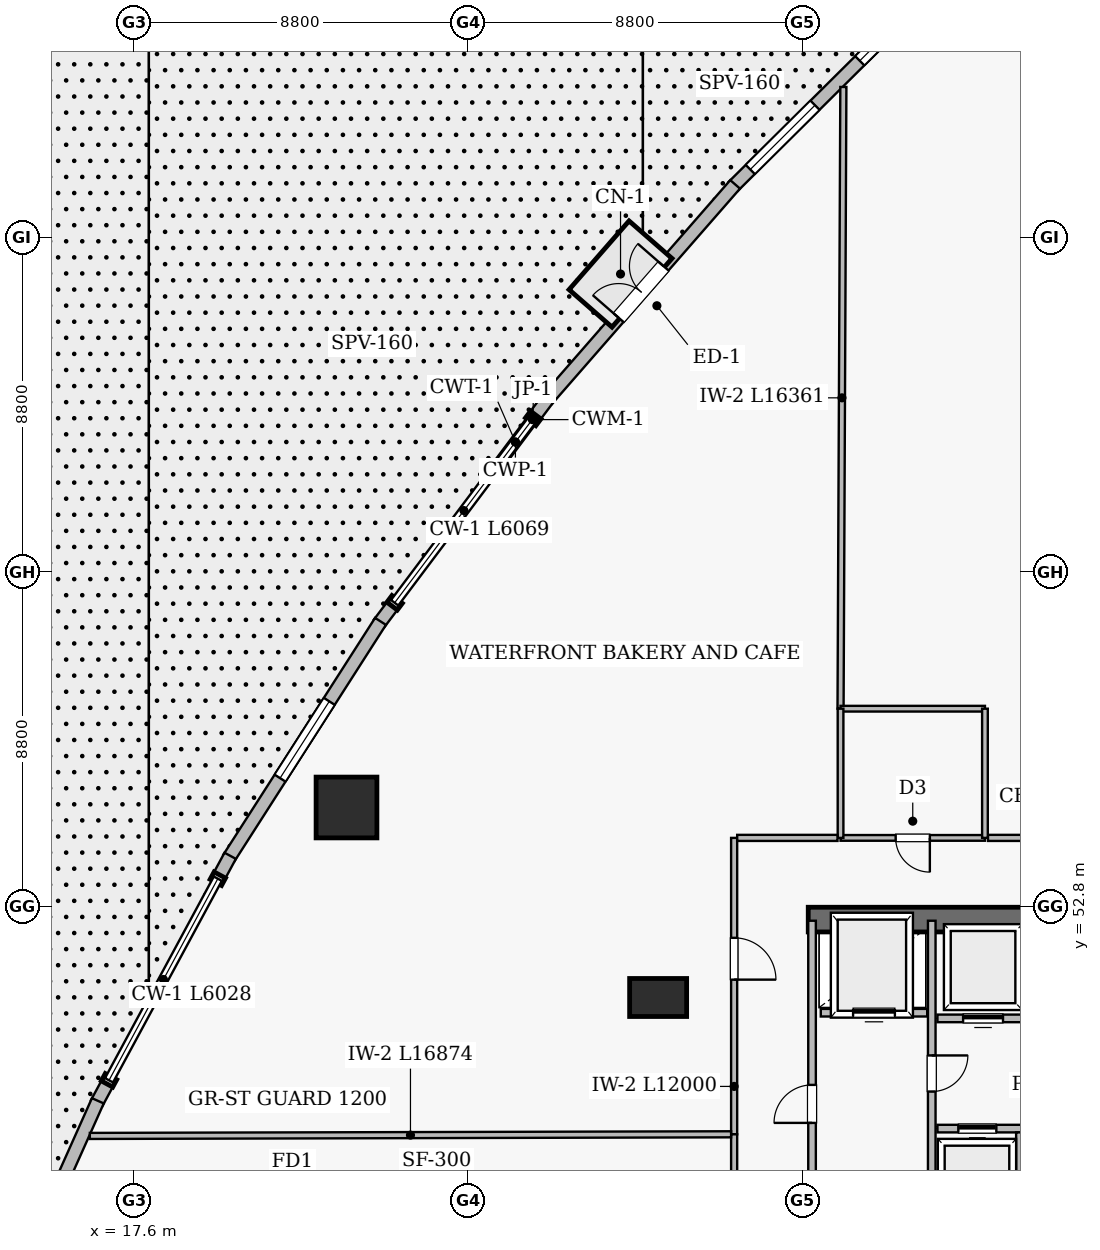
"""IFC4 building model, lengths in metres.
Left out: names, types, materials, properties, quantities, classifications, styles, units other than length and angle.
Written with IfcOpenShell. Run it as: python <this file> out.ifc"""

import sys

from ifc_helpers import new_model, si_unit, direction, frame, frame_2d, origin, origin_2d, place, context, subcontext, project, spatial, rectangle, extrude, element, fill, save


model = new_model("IFC4")
c1 = context("Model", 3, precision=1e-05, world=origin(), true_north=direction((0.0, 1.0)))
c2 = subcontext(c1, "Body", "Model", "MODEL_VIEW")
j1 = project(units=[si_unit("LENGTHUNIT", "METRE"), si_unit("PLANEANGLEUNIT", "RADIAN")], contexts=[c1])
p1 = place(None, origin())
s1 = spatial("IfcSite", under=j1, at=p1, CompositionType="ELEMENT")
p2 = place(p1, origin())
s2 = spatial("IfcBuilding", under=s1, at=p2, CompositionType="ELEMENT")
p3 = place(p2, origin())
s3 = spatial("IfcBuildingStorey", under=s2, at=p3, CompositionType="ELEMENT", Elevation=0.0)
p4 = place(p3, frame((35.35, 52.45, 0.0), z_axis=(0.0, 0.0, 1.0), x_axis=(1.0, 0.0, 0.0)))
e1 = element("IfcWall", 1, at=p4, inside=s3, PredefinedType="SHEAR", context=c2, shape_type="SweptSolid", body=[
    extrude(rectangle(XDim=17.3, YDim=0.65, at=frame_2d((8.65, 0.0))), origin(), (0.0, 0.0, 1.0), 4.5),
])
p5 = place(p3, frame((31.4, 50.4, 0.0), z_axis=(0.0, 0.0, 1.0), x_axis=(1.0, 0.0, 0.0)))
e2 = element("IfcColumn", 2, at=p5, inside=s3, PredefinedType="COLUMN", context=c2, shape_type="SweptSolid", body=[
    extrude(rectangle(XDim=1.5, YDim=1.0, at=origin_2d()), origin(), (0.0, 0.0, 1.0), 4.8),
])
p6 = place(p3, frame((23.2, 55.4, 0.0), z_axis=(0.0, 0.0, 1.0), x_axis=(1.0, 0.0, 0.0)))
e3 = element("IfcColumn", 3, at=p6, inside=s3, PredefinedType="COLUMN", context=c2, shape_type="SweptSolid", body=[
    extrude(rectangle(XDim=1.6, YDim=1.6, at=origin_2d()), origin(), (0.0, 0.0, 1.0), 4.8),
])
p7 = place(p3, frame((38.801, 77.13, 0.0), z_axis=(0.0, 0.0, 1.0), x_axis=(-0.709690172366, -0.704513917, 0.0)))
e4 = element("IfcWall", 4, at=p7, inside=s3, PredefinedType="SOLIDWALL", context=c2, shape_type="SweptSolid", body=[
    extrude(rectangle(XDim=7.641, YDim=0.34, at=frame_2d((3.82, 0.0))), origin(), (0.0, 0.0, 1.0), 4.5),
])
p8 = place(p7, frame((0.552, 0.0, 0.75)))
e5 = element("IfcOpeningElement", 5, at=p8, cuts=e4, PredefinedType="OPENING", context=c2, shape_type="SweptSolid", body=[
    extrude(rectangle(XDim=2.4, YDim=2.2, at=frame_2d((1.2, 1.1))), frame((0.0, 0.18, 0.0), z_axis=(0.0, -1.0, 0.0), x_axis=(1.0, 0.0, 0.0)), (0.0, 0.0, 1.0), 0.36),
])
p9 = place(p7, frame((4.612, 0.0, 0.75)))
e6 = element("IfcOpeningElement", 6, at=p9, cuts=e4, PredefinedType="OPENING", context=c2, shape_type="SweptSolid", body=[
    extrude(rectangle(XDim=2.4, YDim=2.2, at=frame_2d((1.2, 1.1))), frame((0.0, 0.18, 0.0), z_axis=(0.0, -1.0, 0.0), x_axis=(1.0, 0.0, 0.0)), (0.0, 0.0, 1.0), 0.36),
])
p10 = place(p3, frame((33.426, 71.798, 0.0), z_axis=(0.0, 0.0, 1.0), x_axis=(-0.657686013661, -0.753292179327, 0.0)))
e7 = element("IfcWall", 7, at=p10, inside=s3, PredefinedType="SOLIDWALL", context=c2, shape_type="SweptSolid", body=[
    extrude(rectangle(XDim=7.52, YDim=0.34, at=frame_2d((3.76, 0.0))), origin(), (0.0, 0.0, 1.0), 4.5),
])
p11 = place(p10, frame((2.86, 0.0, 0.0)))
e8 = element("IfcOpeningElement", 8, at=p11, cuts=e7, PredefinedType="OPENING", context=c2, shape_type="SweptSolid", body=[
    extrude(rectangle(XDim=1.8, YDim=2.25, at=frame_2d((0.9, 1.125))), frame((0.0, 0.18, 0.0), z_axis=(0.0, -1.0, 0.0), x_axis=(1.0, 0.0, 0.0)), (0.0, 0.0, 1.0), 0.36),
])
p12 = place(p3, frame((28.524, 66.187, 0.0), z_axis=(0.0, 0.0, 1.0), x_axis=(-0.600664888718, -0.799500901477, 0.0)))
e9 = element("IfcWall", 9, at=p12, inside=s3, PredefinedType="SOLIDWALL", context=c2, shape_type="SweptSolid", body=[
    extrude(rectangle(XDim=0.705, YDim=0.34, at=frame_2d((0.353, 0.0))), origin(), (0.0, 0.0, 1.0), 4.5),
])
p13 = place(p3, frame((24.479, 60.804, 0.0), z_axis=(0.0, 0.0, 1.0), x_axis=(-0.600719928326, -0.799459547265, 0.0)))
e10 = element("IfcWall", 10, at=p13, inside=s3, PredefinedType="SOLIDWALL", context=c2, shape_type="SweptSolid", body=[
    extrude(rectangle(XDim=0.705, YDim=0.34, at=frame_2d((0.353, 0.0))), origin(), (0.0, 0.0, 1.0), 4.5),
])
p14 = place(p3, frame((24.095, 60.298, 0.0), z_axis=(0.0, 0.0, 1.0), x_axis=(-0.539522772187, -0.841971007987, 0.0)))
e11 = element("IfcWall", 11, at=p14, inside=s3, PredefinedType="SOLIDWALL", context=c2, shape_type="SweptSolid", body=[
    extrude(rectangle(XDim=7.398, YDim=0.34, at=frame_2d((3.699, 0.0))), origin(), (0.0, 0.0, 1.0), 4.5),
])
p15 = place(p14, frame((2.499, 0.0, 0.75)))
e12 = element("IfcOpeningElement", 12, at=p15, cuts=e11, PredefinedType="OPENING", context=c2, shape_type="SweptSolid", body=[
    extrude(rectangle(XDim=2.4, YDim=2.2, at=frame_2d((1.2, 1.1))), frame((0.0, 0.18, 0.0), z_axis=(0.0, -1.0, 0.0), x_axis=(1.0, 0.0, 0.0)), (0.0, 0.0, 1.0), 0.36),
])
p16 = place(p3, frame((20.139, 54.129, 0.0), z_axis=(0.0, 0.0, 1.0), x_axis=(-0.475111378879, -0.879925665985, 0.0)))
e13 = element("IfcWall", 13, at=p16, inside=s3, PredefinedType="SOLIDWALL", context=c2, shape_type="SweptSolid", body=[
    extrude(rectangle(XDim=0.705, YDim=0.34, at=frame_2d((0.353, 0.0))), origin(), (0.0, 0.0, 1.0), 4.5),
])
p17 = place(p3, frame((16.96, 48.239, 0.0), z_axis=(0.0, 0.0, 1.0), x_axis=(-0.474987965168, -0.879992291413, 0.0)))
e14 = element("IfcWall", 14, at=p17, inside=s3, PredefinedType="SOLIDWALL", context=c2, shape_type="SweptSolid", body=[
    extrude(rectangle(XDim=0.705, YDim=0.34, at=frame_2d((0.352, 0.0))), origin(), (0.0, 0.0, 1.0), 4.5),
])
p18 = place(p3, frame((16.656, 47.682, 0.0), z_axis=(0.0, 0.0, 1.0), x_axis=(-0.408068113154, -0.912951485582, 0.0)))
e15 = element("IfcWall", 15, at=p18, inside=s3, PredefinedType="SOLIDWALL", context=c2, shape_type="SweptSolid", body=[
    extrude(rectangle(XDim=7.439, YDim=0.34, at=frame_2d((3.719, 0.0))), origin(), (0.0, 0.0, 1.0), 4.5),
])
p19 = place(p18, frame((2.33, 0.0, 0.0)))
e16 = element("IfcOpeningElement", 16, at=p19, cuts=e15, PredefinedType="OPENING", context=c2, shape_type="SweptSolid", body=[
    extrude(rectangle(XDim=1.8, YDim=2.25, at=frame_2d((0.9, 1.125))), frame((0.0, 0.18, 0.0), z_axis=(0.0, -1.0, 0.0), x_axis=(1.0, 0.0, 0.0)), (0.0, 0.0, 1.0), 0.36),
])
p20 = place(p3, frame((54.52, 54.6, 0.0), z_axis=(0.0, 0.0, 1.0), x_axis=(-1.0, 0.0, 0.0)))
e17 = element("IfcWall", 17, at=p20, inside=s3, PredefinedType="SOLIDWALL", context=c2, shape_type="SweptSolid", body=[
    extrude(rectangle(XDim=14.44, YDim=0.16, at=frame_2d((7.22, 0.0))), origin(), (0.0, 0.0, 1.0), 3.9),
])
p21 = place(p20, frame((6.67, 0.0, 0.0)))
e18 = element("IfcOpeningElement", 18, at=p21, cuts=e17, PredefinedType="OPENING", context=c2, shape_type="SweptSolid", body=[
    extrude(rectangle(XDim=1.1, YDim=2.15, at=frame_2d((0.55, 1.075))), frame((0.0, 0.09, 0.0), z_axis=(0.0, -1.0, 0.0), x_axis=(1.0, 0.0, 0.0)), (0.0, 0.0, 1.0), 0.18),
])
p22 = place(p3, frame((35.45, 44.5, 0.0), z_axis=(0.0, 0.0, 1.0), x_axis=(0.0, 1.0, 0.0)))
e19 = element("IfcWall", 19, at=p22, inside=s3, PredefinedType="SOLIDWALL", context=c2, shape_type="SweptSolid", body=[
    extrude(rectangle(XDim=7.92, YDim=0.2, at=frame_2d((3.96, 0.0))), origin(), (0.0, 0.0, 1.0), 4.5),
])
p23 = place(p22, frame((2.6, 0.0, 0.0)))
e20 = element("IfcOpeningElement", 20, at=p23, cuts=e19, PredefinedType="OPENING", context=c2, shape_type="SweptSolid", body=[
    extrude(rectangle(XDim=1.0, YDim=2.15, at=frame_2d((0.5, 1.075))), frame((0.0, 0.11, 0.0), z_axis=(0.0, -1.0, 0.0), x_axis=(1.0, 0.0, 0.0)), (0.0, 0.0, 1.0), 0.22),
])
p24 = place(p3, frame((38.6, 44.5, 0.0), z_axis=(0.0, 0.0, 1.0), x_axis=(0.0, 1.0, 0.0)))
e21 = element("IfcWall", 21, at=p24, inside=s3, PredefinedType="SOLIDWALL", context=c2, shape_type="SweptSolid", body=[
    extrude(rectangle(XDim=7.92, YDim=0.2, at=frame_2d((3.96, 0.0))), origin(), (0.0, 0.0, 1.0), 4.5),
])
p25 = place(p24, frame((3.425, 0.0, 0.0)))
e22 = element("IfcOpeningElement", 22, at=p25, cuts=e21, PredefinedType="OPENING", context=c2, shape_type="SweptSolid", body=[
    extrude(rectangle(XDim=0.95, YDim=2.15, at=frame_2d((0.475, 1.075))), frame((0.0, 0.11, 0.0), z_axis=(0.0, -1.0, 0.0), x_axis=(1.0, 0.0, 0.0)), (0.0, 0.0, 1.0), 0.22),
])
p26 = place(p3, frame((33.4, 54.6, 0.0), z_axis=(0.0, 0.0, 1.0), x_axis=(0.0, -1.0, 0.0)))
e23 = element("IfcWall", 23, at=p26, inside=s3, PredefinedType="SOLIDWALL", context=c2, shape_type="SweptSolid", body=[
    extrude(rectangle(XDim=7.8, YDim=0.16, at=frame_2d((3.9, 0.0))), origin(), (0.0, 0.0, 1.0), 3.9),
])
p27 = place(p26, frame((2.63, 0.0, 0.0)))
e24 = element("IfcOpeningElement", 24, at=p27, cuts=e23, PredefinedType="OPENING", context=c2, shape_type="SweptSolid", body=[
    extrude(rectangle(XDim=1.1, YDim=2.15, at=frame_2d((0.55, 1.075))), frame((0.0, 0.09, 0.0), z_axis=(0.0, -1.0, 0.0), x_axis=(1.0, 0.0, 0.0)), (0.0, 0.0, 1.0), 0.18),
])
p28 = place(p3, frame((38.75, 49.85, 0.0), z_axis=(0.0, 0.0, 1.0), x_axis=(1.0, 0.0, 0.0)))
e25 = element("IfcWall", 25, at=p28, inside=s3, PredefinedType="SOLIDWALL", context=c2, shape_type="SweptSolid", body=[
    extrude(rectangle(XDim=5.5, YDim=0.2, at=frame_2d((2.75, 0.0))), origin(), (0.0, 0.0, 1.0), 4.5),
])
p29 = place(p28, frame((0.675, 0.0, 0.0)))
e26 = element("IfcOpeningElement", 26, at=p29, cuts=e25, PredefinedType="OPENING", context=c2, shape_type="SweptSolid", body=[
    extrude(rectangle(XDim=1.05, YDim=2.15, at=frame_2d((0.525, 1.075))), frame((0.0, 0.11, 0.0), z_axis=(0.0, -1.0, 0.0), x_axis=(1.0, 0.0, 0.0)), (0.0, 0.0, 1.0), 0.22),
])
p30 = place(p28, frame((3.075, 0.0, 0.0)))
e27 = element("IfcOpeningElement", 27, at=p30, cuts=e25, PredefinedType="OPENING", context=c2, shape_type="SweptSolid", body=[
    extrude(rectangle(XDim=1.05, YDim=2.15, at=frame_2d((0.525, 1.075))), frame((0.0, 0.11, 0.0), z_axis=(0.0, -1.0, 0.0), x_axis=(1.0, 0.0, 0.0)), (0.0, 0.0, 1.0), 0.22),
])
p31 = place(p3, frame((38.75, 46.95, 0.0), z_axis=(0.0, 0.0, 1.0), x_axis=(1.0, 0.0, 0.0)))
e28 = element("IfcWall", 28, at=p31, inside=s3, PredefinedType="SOLIDWALL", context=c2, shape_type="SweptSolid", body=[
    extrude(rectangle(XDim=4.33, YDim=0.2, at=frame_2d((2.165, 0.0))), origin(), (0.0, 0.0, 1.0), 4.5),
])
p32 = place(p31, frame((0.55, 0.0, 0.0)))
e29 = element("IfcOpeningElement", 29, at=p32, cuts=e28, PredefinedType="OPENING", context=c2, shape_type="SweptSolid", body=[
    extrude(rectangle(XDim=1.0, YDim=2.15, at=frame_2d((0.5, 1.075))), frame((0.0, 0.11, 0.0), z_axis=(0.0, -1.0, 0.0), x_axis=(1.0, 0.0, 0.0)), (0.0, 0.0, 1.0), 0.22),
])
p33 = place(p31, frame((2.75, 0.0, 0.0)))
e30 = element("IfcOpeningElement", 30, at=p33, cuts=e28, PredefinedType="OPENING", context=c2, shape_type="SweptSolid", body=[
    extrude(rectangle(XDim=1.0, YDim=2.15, at=frame_2d((0.5, 1.075))), frame((0.0, 0.11, 0.0), z_axis=(0.0, -1.0, 0.0), x_axis=(1.0, 0.0, 0.0)), (0.0, 0.0, 1.0), 0.22),
])
p34 = place(p3, frame((33.4, 46.8, 0.0), z_axis=(0.0, 0.0, 1.0), x_axis=(0.0, -1.0, 0.0)))
e31 = element("IfcWall", 31, at=p34, inside=s3, PredefinedType="SOLIDWALL", context=c2, shape_type="SweptSolid", body=[
    extrude(rectangle(XDim=4.2, YDim=0.16, at=frame_2d((2.1, 0.0))), origin(), (0.0, 0.0, 1.0), 3.738),
])
p35 = place(p34, frame((1.55, 0.0, 0.0)))
e32 = element("IfcOpeningElement", 32, at=p35, cuts=e31, PredefinedType="OPENING", context=c2, shape_type="SweptSolid", body=[
    extrude(rectangle(XDim=1.1, YDim=2.15, at=frame_2d((0.55, 1.075))), frame((0.0, 0.09, 0.0), z_axis=(0.0, -1.0, 0.0), x_axis=(1.0, 0.0, 0.0)), (0.0, 0.0, 1.0), 0.18),
])
p36 = place(p3, frame((40.0, 54.6, 0.0), z_axis=(0.0, 0.0, 1.0), x_axis=(-1.0, 0.0, 0.0)))
e33 = element("IfcWall", 33, at=p36, inside=s3, PredefinedType="PLUMBINGWALL", context=c2, shape_type="SweptSolid", body=[
    extrude(rectangle(XDim=3.8, YDim=0.15, at=frame_2d((1.9, 0.0))), origin(), (0.0, 0.0, 1.0), 3.9),
])
p37 = place(p36, frame((1.45, 0.0, 0.0)))
e34 = element("IfcOpeningElement", 34, at=p37, cuts=e33, PredefinedType="OPENING", context=c2, shape_type="SweptSolid", body=[
    extrude(rectangle(XDim=0.9, YDim=2.1, at=frame_2d((0.45, 1.05))), frame((0.0, 0.085, 0.0), z_axis=(0.0, -1.0, 0.0), x_axis=(1.0, 0.0, 0.0)), (0.0, 0.0, 1.0), 0.17),
])
p38 = place(p3, frame((35.68, 50.0, 0.0), z_axis=(0.0, 0.0, 1.0), x_axis=(1.0, 0.0, 0.0)))
e35 = element("IfcWall", 35, at=p38, inside=s3, PredefinedType="SOLIDWALL", context=c2, shape_type="SweptSolid", body=[
    extrude(rectangle(XDim=2.8, YDim=0.2, at=frame_2d((1.4, 0.0))), origin(), (0.0, 0.0, 1.0), 4.5),
])
p39 = place(p38, frame((0.85, 0.0, 0.0)))
e36 = element("IfcOpeningElement", 36, at=p39, cuts=e35, PredefinedType="OPENING", context=c2, shape_type="SweptSolid", body=[
    extrude(rectangle(XDim=1.1, YDim=2.15, at=frame_2d((0.55, 1.075))), frame((0.0, 0.11, 0.0), z_axis=(0.0, -1.0, 0.0), x_axis=(1.0, 0.0, 0.0)), (0.0, 0.0, 1.0), 0.22),
])
p40 = place(p3, frame((33.32, 46.8, 0.0), z_axis=(0.0, 0.0, 1.0), x_axis=(-0.999996757828, -0.002546435404, 0.0)))
e37 = element("IfcWall", 37, at=p40, inside=s3, PredefinedType="SOLIDWALL", context=c2, shape_type="SweptSolid", body=[
    extrude(rectangle(XDim=16.874, YDim=0.16, at=frame_2d((8.437, 0.0))), origin(), (0.0, 0.0, 1.0), 3.738),
])
p41 = place(p3, frame((36.2, 58.0, 0.0), z_axis=(0.0, 0.0, 1.0), x_axis=(0.004521329597, 0.999989778737, 0.0)))
e38 = element("IfcWall", 38, at=p41, inside=s3, PredefinedType="SOLIDWALL", context=c2, shape_type="SweptSolid", body=[
    extrude(rectangle(XDim=16.361, YDim=0.16, at=frame_2d((8.181, 0.0))), origin(), (0.0, 0.0, 1.0), 3.788),
])
p42 = place(p3, frame((40.0, 58.0, 0.0), z_axis=(0.0, 0.0, 1.0), x_axis=(-1.0, 0.0, 0.0)))
e39 = element("IfcWall", 39, at=p42, inside=s3, PredefinedType="PLUMBINGWALL", context=c2, shape_type="SweptSolid", body=[
    extrude(rectangle(XDim=3.8, YDim=0.15, at=frame_2d((1.9, 0.0))), origin(), (0.0, 0.0, 1.0), 4.5),
])
p43 = place(p3, frame((36.2, 58.0, 0.0), z_axis=(0.0, 0.0, 1.0), x_axis=(0.0, -1.0, 0.0)))
e40 = element("IfcWall", 40, at=p43, inside=s3, PredefinedType="PLUMBINGWALL", context=c2, shape_type="SweptSolid", body=[
    extrude(rectangle(XDim=3.4, YDim=0.15, at=frame_2d((1.7, 0.0))), origin(), (0.0, 0.0, 1.0), 4.5),
])
p44 = place(p3, frame((40.0, 54.6, 0.0), z_axis=(0.0, 0.0, 1.0), x_axis=(0.0, 1.0, 0.0)))
e41 = element("IfcWall", 41, at=p44, inside=s3, PredefinedType="PLUMBINGWALL", context=c2, shape_type="SweptSolid", body=[
    extrude(rectangle(XDim=3.4, YDim=0.15, at=frame_2d((1.7, 0.0))), origin(), (0.0, 0.0, 1.0), 3.9),
])
p45 = place(p3, frame((36.12, 54.6, 0.0), z_axis=(0.0, 0.0, 1.0), x_axis=(-1.0, 0.0, 0.0)))
e42 = element("IfcWall", 42, at=p45, inside=s3, PredefinedType="SOLIDWALL", context=c2, shape_type="SweptSolid", body=[
    extrude(rectangle(XDim=2.64, YDim=0.16, at=frame_2d((1.32, 0.0))), origin(), (0.0, 0.0, 1.0), 4.5),
])
p46 = place(p3, frame((40.9, 44.3, 0.0), z_axis=(0.0, 0.0, 1.0), x_axis=(0.0, 1.0, 0.0)))
e43 = element("IfcWall", 43, at=p46, inside=s3, PredefinedType="SOLIDWALL", context=c2, shape_type="SweptSolid", body=[
    extrude(rectangle(XDim=2.55, YDim=0.16, at=frame_2d((1.275, 0.0))), origin(), (0.0, 0.0, 1.0), 4.5),
])
p47 = place(p8, origin())
e44 = element("IfcWindow", 44, at=p47, inside=s3, PartitioningType="SINGLE_PANEL", PredefinedType="WINDOW", context=c2, shape_type="SweptSolid", body=[
    extrude(rectangle(XDim=2.4, YDim=2.2, at=frame_2d((1.2, 1.1))), frame((0.0, 0.03, 0.0), z_axis=(0.0, -1.0, 0.0), x_axis=(1.0, 0.0, 0.0)), (0.0, 0.0, 1.0), 0.06),
])
fill(e5, e44)
p48 = place(p9, origin())
e45 = element("IfcWindow", 45, at=p48, inside=s3, PartitioningType="SINGLE_PANEL", PredefinedType="WINDOW", context=c2, shape_type="SweptSolid", body=[
    extrude(rectangle(XDim=2.4, YDim=2.2, at=frame_2d((1.2, 1.1))), frame((0.0, 0.03, 0.0), z_axis=(0.0, -1.0, 0.0), x_axis=(1.0, 0.0, 0.0)), (0.0, 0.0, 1.0), 0.06),
])
fill(e6, e45)
p49 = place(p11, frame((1.8, 0.0, 0.0), z_axis=(0.0, 0.0, 1.0), x_axis=(-1.0, 0.0, 0.0)))
e46 = element("IfcDoor", 46, at=p49, inside=s3, OperationType="DOUBLE_DOOR_SINGLE_SWING", PredefinedType="DOOR", context=c2, shape_type="SweptSolid", body=[
    extrude(rectangle(XDim=1.8, YDim=2.25, at=frame_2d((0.9, 1.125))), frame((0.0, 0.025, 0.0), z_axis=(0.0, -1.0, 0.0), x_axis=(1.0, 0.0, 0.0)), (0.0, 0.0, 1.0), 0.05),
])
fill(e8, e46)
p50 = place(p15, origin())
e47 = element("IfcWindow", 47, at=p50, inside=s3, PartitioningType="SINGLE_PANEL", PredefinedType="WINDOW", context=c2, shape_type="SweptSolid", body=[
    extrude(rectangle(XDim=2.4, YDim=2.2, at=frame_2d((1.2, 1.1))), frame((0.0, 0.03, 0.0), z_axis=(0.0, -1.0, 0.0), x_axis=(1.0, 0.0, 0.0)), (0.0, 0.0, 1.0), 0.06),
])
fill(e12, e47)
p51 = place(p23, origin())
e48 = element("IfcDoor", 48, at=p51, inside=s3, OperationType="SINGLE_SWING_LEFT", PredefinedType="DOOR", context=c2, shape_type="SweptSolid", body=[
    extrude(rectangle(XDim=1.0, YDim=2.15, at=frame_2d((0.5, 1.075))), frame((0.0, 0.025, 0.0), z_axis=(0.0, -1.0, 0.0), x_axis=(1.0, 0.0, 0.0)), (0.0, 0.0, 1.0), 0.05),
])
fill(e20, e48)
p52 = place(p25, frame((0.95, 0.0, 0.0), z_axis=(0.0, 0.0, 1.0), x_axis=(-1.0, 0.0, 0.0)))
e49 = element("IfcDoor", 49, at=p52, inside=s3, OperationType="SINGLE_SWING_RIGHT", PredefinedType="DOOR", context=c2, shape_type="SweptSolid", body=[
    extrude(rectangle(XDim=0.95, YDim=2.15, at=frame_2d((0.475, 1.075))), frame((0.0, 0.025, 0.0), z_axis=(0.0, -1.0, 0.0), x_axis=(1.0, 0.0, 0.0)), (0.0, 0.0, 1.0), 0.05),
])
fill(e22, e49)
p53 = place(p39, origin())
e50 = element("IfcDoor", 50, at=p53, inside=s3, OperationType="SLIDING_TO_LEFT", PredefinedType="DOOR", context=c2, shape_type="SweptSolid", body=[
    extrude(rectangle(XDim=1.1, YDim=2.15, at=frame_2d((0.55, 1.075))), frame((0.0, 0.025, 0.0), z_axis=(0.0, -1.0, 0.0), x_axis=(1.0, 0.0, 0.0)), (0.0, 0.0, 1.0), 0.05),
])
fill(e36, e50)
p54 = place(p29, origin())
e51 = element("IfcDoor", 51, at=p54, inside=s3, OperationType="SLIDING_TO_LEFT", PredefinedType="DOOR", context=c2, shape_type="SweptSolid", body=[
    extrude(rectangle(XDim=1.05, YDim=2.15, at=frame_2d((0.525, 1.075))), frame((0.0, 0.025, 0.0), z_axis=(0.0, -1.0, 0.0), x_axis=(1.0, 0.0, 0.0)), (0.0, 0.0, 1.0), 0.05),
])
fill(e26, e51)
p55 = place(p32, origin())
e52 = element("IfcDoor", 52, at=p55, inside=s3, OperationType="SLIDING_TO_LEFT", PredefinedType="DOOR", context=c2, shape_type="SweptSolid", body=[
    extrude(rectangle(XDim=1.0, YDim=2.15, at=frame_2d((0.5, 1.075))), frame((0.0, 0.025, 0.0), z_axis=(0.0, -1.0, 0.0), x_axis=(1.0, 0.0, 0.0)), (0.0, 0.0, 1.0), 0.05),
])
fill(e29, e52)
p56 = place(p37, origin())
e53 = element("IfcDoor", 53, at=p56, inside=s3, OperationType="SINGLE_SWING_LEFT", PredefinedType="DOOR", context=c2, shape_type="SweptSolid", body=[
    extrude(rectangle(XDim=0.9, YDim=2.1, at=frame_2d((0.45, 1.05))), frame((0.0, 0.025, 0.0), z_axis=(0.0, -1.0, 0.0), x_axis=(1.0, 0.0, 0.0)), (0.0, 0.0, 1.0), 0.05),
])
fill(e34, e53)
p57 = place(p27, origin())
e54 = element("IfcDoor", 54, at=p57, inside=s3, OperationType="SINGLE_SWING_RIGHT", PredefinedType="DOOR", context=c2, shape_type="SweptSolid", body=[
    extrude(rectangle(XDim=1.1, YDim=2.15, at=frame_2d((0.55, 1.075))), frame((0.0, 0.025, 0.0), z_axis=(0.0, -1.0, 0.0), x_axis=(1.0, 0.0, 0.0)), (0.0, 0.0, 1.0), 0.05),
])
fill(e24, e54)
save(model, sys.argv[1])
